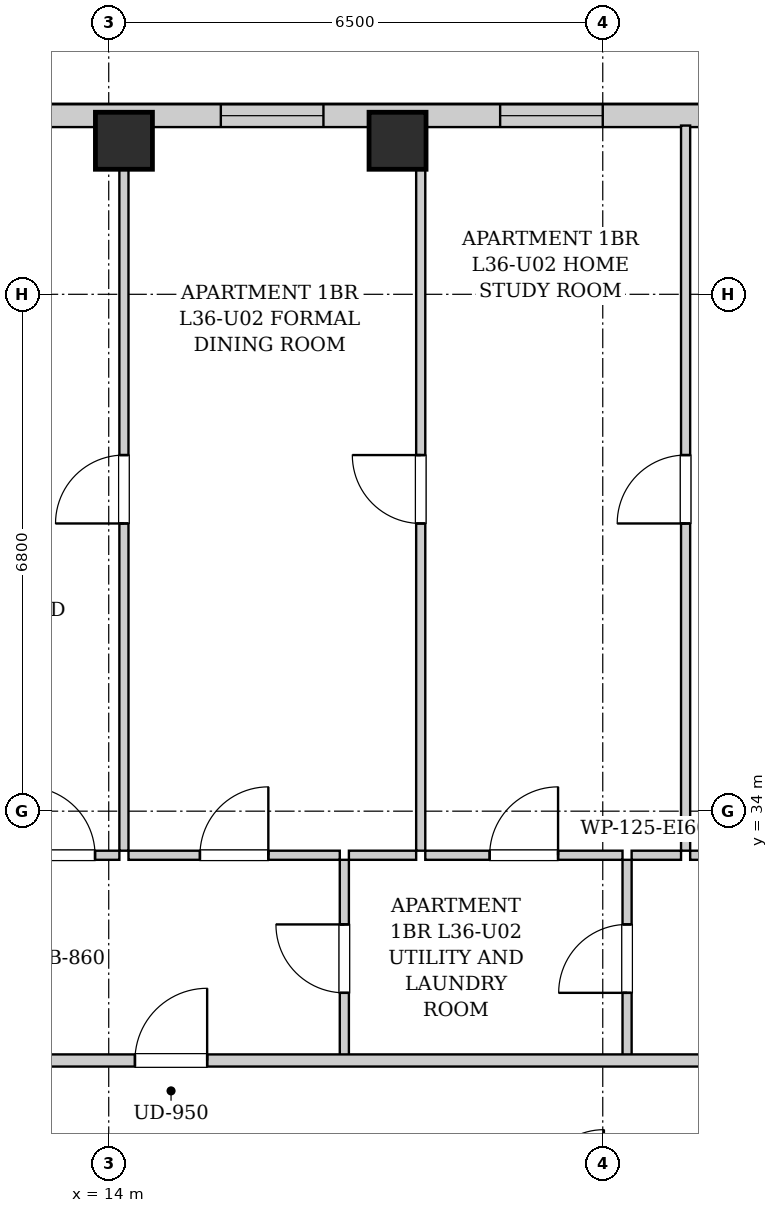
"""IFC4 building model, lengths in metres.
Left out: names, types, materials, properties, quantities, classifications, styles, units other than length and angle.
Written with IfcOpenShell. Run it as: python <this file> out.ifc"""

import sys

from ifc_helpers import new_model, si_unit, direction, frame, frame_2d, origin, origin_2d, place, context, subcontext, project, spatial, rectangle, extrude, element, fill, save


model = new_model("IFC4")
c1 = context("Model", 3, precision=1e-05, world=origin(), true_north=direction((0.0, 1.0)))
c2 = subcontext(c1, "Body", "Model", "MODEL_VIEW")
j1 = project(units=[si_unit("LENGTHUNIT", "METRE"), si_unit("PLANEANGLEUNIT", "RADIAN")], contexts=[c1])
p1 = place(None, origin())
s1 = spatial("IfcSite", under=j1, at=p1, CompositionType="ELEMENT")
p2 = place(p1, origin())
s2 = spatial("IfcBuilding", under=s1, at=p2, CompositionType="ELEMENT")
p3 = place(p2, frame((0.0, 0.0, 127.65)))
s3 = spatial("IfcBuildingStorey", under=s2, at=p3, CompositionType="ELEMENT", Elevation=127.65)
for number, where, z_axis, x_axis in (
    (1, (14.2, 42.82, 0.0), (0.0, 0.0, 1.0), (1.0, 0.0, 0.0)),
    (2, (17.8, 42.82, 0.0), (0.0, 0.0, 1.0), (1.0, 0.0, 0.0)),
):
    element("IfcColumn", number, at=place(p3, frame(where, z_axis=z_axis, x_axis=x_axis)), inside=s3, PredefinedType="COLUMN", context=c2, shape_type="SweptSolid", body=[
        extrude(rectangle(XDim=0.75, YDim=0.75, at=origin_2d()), origin(), (0.0, 0.0, 1.0), 3.25),
    ])
p4 = place(p3, frame((10.0, 43.15, 0.0), z_axis=(0.0, 0.0, 1.0), x_axis=(1.0, 0.0, 0.0)))
e3 = element("IfcWall", 3, at=p4, inside=s3, PredefinedType="SOLIDWALL", context=c2, shape_type="SweptSolid", body=[
    extrude(rectangle(XDim=21.9, YDim=0.3, at=frame_2d((10.95, 0.0))), origin(), (0.0, 0.0, 1.0), 2.99),
])
p5 = place(p4, frame((5.475, 0.0, 0.55)))
e4 = element("IfcOpeningElement", 4, at=p5, cuts=e3, PredefinedType="OPENING", context=c2, shape_type="SweptSolid", body=[
    extrude(rectangle(XDim=1.35, YDim=1.2, at=frame_2d((0.675, 0.6))), frame((0.0, 0.16, 0.0), z_axis=(0.0, -1.0, 0.0), x_axis=(1.0, 0.0, 0.0)), (0.0, 0.0, 1.0), 0.32),
])
p6 = place(p4, frame((9.15, 0.0, 0.55)))
e5 = element("IfcOpeningElement", 5, at=p6, cuts=e3, PredefinedType="OPENING", context=c2, shape_type="SweptSolid", body=[
    extrude(rectangle(XDim=1.35, YDim=1.2, at=frame_2d((0.675, 0.6))), frame((0.0, 0.16, 0.0), z_axis=(0.0, -1.0, 0.0), x_axis=(1.0, 0.0, 0.0)), (0.0, 0.0, 1.0), 0.32),
])
p7 = place(p4, frame((17.5, 0.0, 0.55)))
e6 = element("IfcOpeningElement", 6, at=p7, cuts=e3, PredefinedType="OPENING", context=c2, shape_type="SweptSolid", body=[
    extrude(rectangle(XDim=1.35, YDim=1.2, at=frame_2d((0.675, 0.6))), frame((0.0, 0.16, 0.0), z_axis=(0.0, -1.0, 0.0), x_axis=(1.0, 0.0, 0.0)), (0.0, 0.0, 1.0), 0.32),
])
p8 = place(p4, frame((19.8, 0.0, 0.55)))
e7 = element("IfcOpeningElement", 7, at=p8, cuts=e3, PredefinedType="OPENING", context=c2, shape_type="SweptSolid", body=[
    extrude(rectangle(XDim=1.35, YDim=1.2, at=frame_2d((0.675, 0.6))), frame((0.0, 0.16, 0.0), z_axis=(0.0, -1.0, 0.0), x_axis=(1.0, 0.0, 0.0)), (0.0, 0.0, 1.0), 0.32),
])
p9 = place(p3, frame((17.1, 30.76, 0.0), z_axis=(0.0, 0.0, 1.0), x_axis=(0.0, 1.0, 0.0)))
e8 = element("IfcWall", 8, at=p9, inside=s3, PredefinedType="PARTITIONING", context=c2, shape_type="SweptSolid", body=[
    extrude(rectangle(XDim=2.6, YDim=0.12, at=frame_2d((1.3, 0.0))), origin(), (0.0, 0.0, 1.0), 2.99),
])
p10 = place(p9, frame((0.85, 0.0, 0.0)))
e9 = element("IfcOpeningElement", 9, at=p10, cuts=e8, PredefinedType="OPENING", context=c2, shape_type="SweptSolid", body=[
    extrude(rectangle(XDim=0.9, YDim=2.05, at=frame_2d((0.45, 1.025))), frame((0.0, 0.07, 0.0), z_axis=(0.0, -1.0, 0.0), x_axis=(1.0, 0.0, 0.0)), (0.0, 0.0, 1.0), 0.14),
])
p11 = place(p3, frame((12.6, 33.42, 0.0), z_axis=(0.0, 0.0, 1.0), x_axis=(1.0, 0.0, 0.0)))
e10 = element("IfcWall", 10, at=p11, inside=s3, PredefinedType="PARTITIONING", context=c2, shape_type="SweptSolid", body=[
    extrude(rectangle(XDim=1.54, YDim=0.12, at=frame_2d((0.77, 0.0))), origin(), (0.0, 0.0, 1.0), 2.99),
])
p12 = place(p11, frame((0.32, 0.0, 0.0)))
e11 = element("IfcOpeningElement", 11, at=p12, cuts=e10, PredefinedType="OPENING", context=c2, shape_type="SweptSolid", body=[
    extrude(rectangle(XDim=0.9, YDim=2.05, at=frame_2d((0.45, 1.025))), frame((0.0, 0.07, 0.0), z_axis=(0.0, -1.0, 0.0), x_axis=(1.0, 0.0, 0.0)), (0.0, 0.0, 1.0), 0.14),
])
p13 = place(p3, frame((14.26, 33.42, 0.0), z_axis=(0.0, 0.0, 1.0), x_axis=(1.0, 0.0, 0.0)))
e12 = element("IfcWall", 12, at=p13, inside=s3, PredefinedType="PARTITIONING", context=c2, shape_type="SweptSolid", body=[
    extrude(rectangle(XDim=2.78, YDim=0.12, at=frame_2d((1.39, 0.0))), origin(), (0.0, 0.0, 1.0), 2.99),
])
p14 = place(p13, frame((0.94, 0.0, 0.0)))
e13 = element("IfcOpeningElement", 13, at=p14, cuts=e12, PredefinedType="OPENING", context=c2, shape_type="SweptSolid", body=[
    extrude(rectangle(XDim=0.9, YDim=2.05, at=frame_2d((0.45, 1.025))), frame((0.0, 0.07, 0.0), z_axis=(0.0, -1.0, 0.0), x_axis=(1.0, 0.0, 0.0)), (0.0, 0.0, 1.0), 0.14),
])
p15 = place(p3, frame((20.82, 30.76, 0.0), z_axis=(0.0, 0.0, 1.0), x_axis=(0.0, 1.0, 0.0)))
e14 = element("IfcWall", 14, at=p15, inside=s3, PredefinedType="PARTITIONING", context=c2, shape_type="SweptSolid", body=[
    extrude(rectangle(XDim=2.6, YDim=0.12, at=frame_2d((1.3, 0.0))), origin(), (0.0, 0.0, 1.0), 2.99),
])
p16 = place(p15, frame((0.85, 0.0, 0.0)))
e15 = element("IfcOpeningElement", 15, at=p16, cuts=e14, PredefinedType="OPENING", context=c2, shape_type="SweptSolid", body=[
    extrude(rectangle(XDim=0.9, YDim=2.05, at=frame_2d((0.45, 1.025))), frame((0.0, 0.07, 0.0), z_axis=(0.0, -1.0, 0.0), x_axis=(1.0, 0.0, 0.0)), (0.0, 0.0, 1.0), 0.14),
])
p17 = place(p3, frame((17.16, 33.42, 0.0), z_axis=(0.0, 0.0, 1.0), x_axis=(1.0, 0.0, 0.0)))
e16 = element("IfcWall", 16, at=p17, inside=s3, PredefinedType="PARTITIONING", context=c2, shape_type="SweptSolid", body=[
    extrude(rectangle(XDim=0.885, YDim=0.12, at=frame_2d((0.442, 0.0))), origin(), (0.0, 0.0, 1.0), 2.99),
])
p18 = place(p3, frame((18.165, 33.42, 0.0), z_axis=(0.0, 0.0, 1.0), x_axis=(1.0, 0.0, 0.0)))
e17 = element("IfcWall", 17, at=p18, inside=s3, PredefinedType="PARTITIONING", context=c2, shape_type="SweptSolid", body=[
    extrude(rectangle(XDim=2.595, YDim=0.12, at=frame_2d((1.297, 0.0))), origin(), (0.0, 0.0, 1.0), 2.99),
])
p19 = place(p18, frame((0.847, 0.0, 0.0)))
e18 = element("IfcOpeningElement", 18, at=p19, cuts=e17, PredefinedType="OPENING", context=c2, shape_type="SweptSolid", body=[
    extrude(rectangle(XDim=0.9, YDim=2.05, at=frame_2d((0.45, 1.025))), frame((0.0, 0.07, 0.0), z_axis=(0.0, -1.0, 0.0), x_axis=(1.0, 0.0, 0.0)), (0.0, 0.0, 1.0), 0.14),
])
p20 = place(p3, frame((20.88, 33.42, 0.0), z_axis=(0.0, 0.0, 1.0), x_axis=(1.0, 0.0, 0.0)))
e19 = element("IfcWall", 19, at=p20, inside=s3, PredefinedType="PARTITIONING", context=c2, shape_type="SweptSolid", body=[
    extrude(rectangle(XDim=0.65, YDim=0.12, at=frame_2d((0.325, 0.0))), origin(), (0.0, 0.0, 1.0), 2.99),
])
p21 = place(p3, frame((21.65, 33.42, 0.0), z_axis=(0.0, 0.0, 1.0), x_axis=(1.0, 0.0, 0.0)))
e20 = element("IfcWall", 20, at=p21, inside=s3, PredefinedType="PARTITIONING", context=c2, shape_type="SweptSolid", body=[
    extrude(rectangle(XDim=2.38, YDim=0.12, at=frame_2d((1.19, 0.0))), origin(), (0.0, 0.0, 1.0), 2.99),
])
p22 = place(p21, frame((0.74, 0.0, 0.0)))
e21 = element("IfcOpeningElement", 21, at=p22, cuts=e20, PredefinedType="OPENING", context=c2, shape_type="SweptSolid", body=[
    extrude(rectangle(XDim=0.9, YDim=2.05, at=frame_2d((0.45, 1.025))), frame((0.0, 0.07, 0.0), z_axis=(0.0, -1.0, 0.0), x_axis=(1.0, 0.0, 0.0)), (0.0, 0.0, 1.0), 0.14),
])
p23 = place(p3, frame((14.2, 33.48, 0.0), z_axis=(0.0, 0.0, 1.0), x_axis=(0.0, 1.0, 0.0)))
e22 = element("IfcWall", 22, at=p23, inside=s3, PredefinedType="PARTITIONING", context=c2, shape_type="SweptSolid", body=[
    extrude(rectangle(XDim=9.54, YDim=0.12, at=frame_2d((4.77, 0.0))), origin(), (0.0, 0.0, 1.0), 2.99),
])
p24 = place(p23, frame((4.305, 0.0, 0.0)))
e23 = element("IfcOpeningElement", 23, at=p24, cuts=e22, PredefinedType="OPENING", context=c2, shape_type="SweptSolid", body=[
    extrude(rectangle(XDim=0.9, YDim=2.05, at=frame_2d((0.45, 1.025))), frame((0.0, 0.07, 0.0), z_axis=(0.0, -1.0, 0.0), x_axis=(1.0, 0.0, 0.0)), (0.0, 0.0, 1.0), 0.14),
])
p25 = place(p3, frame((18.105, 33.48, 0.0), z_axis=(0.0, 0.0, 1.0), x_axis=(0.0, 1.0, 0.0)))
e24 = element("IfcWall", 24, at=p25, inside=s3, PredefinedType="PARTITIONING", context=c2, shape_type="SweptSolid", body=[
    extrude(rectangle(XDim=9.54, YDim=0.12, at=frame_2d((4.77, 0.0))), origin(), (0.0, 0.0, 1.0), 2.99),
])
p26 = place(p25, frame((4.305, 0.0, 0.0)))
e25 = element("IfcOpeningElement", 25, at=p26, cuts=e24, PredefinedType="OPENING", context=c2, shape_type="SweptSolid", body=[
    extrude(rectangle(XDim=0.9, YDim=2.05, at=frame_2d((0.45, 1.025))), frame((0.0, 0.07, 0.0), z_axis=(0.0, -1.0, 0.0), x_axis=(1.0, 0.0, 0.0)), (0.0, 0.0, 1.0), 0.14),
])
p27 = place(p3, frame((21.59, 33.48, 0.0), z_axis=(0.0, 0.0, 1.0), x_axis=(0.0, 1.0, 0.0)))
e26 = element("IfcWall", 26, at=p27, inside=s3, PredefinedType="PARTITIONING", context=c2, shape_type="SweptSolid", body=[
    extrude(rectangle(XDim=9.54, YDim=0.12, at=frame_2d((4.77, 0.0))), origin(), (0.0, 0.0, 1.0), 2.99),
])
p28 = place(p27, frame((4.305, 0.0, 0.0)))
e27 = element("IfcOpeningElement", 27, at=p28, cuts=e26, PredefinedType="OPENING", context=c2, shape_type="SweptSolid", body=[
    extrude(rectangle(XDim=0.9, YDim=2.05, at=frame_2d((0.45, 1.025))), frame((0.0, 0.07, 0.0), z_axis=(0.0, -1.0, 0.0), x_axis=(1.0, 0.0, 0.0)), (0.0, 0.0, 1.0), 0.14),
])
p29 = place(p3, frame((10.05, 30.72, 0.0), z_axis=(0.0, 0.0, 1.0), x_axis=(1.0, 0.0, 0.0)))
e28 = element("IfcWall", 28, at=p29, inside=s3, PredefinedType="PARTITIONING", context=c2, shape_type="SweptSolid", body=[
    extrude(rectangle(XDim=27.7, YDim=0.16, at=frame_2d((13.85, 0.0))), origin(), (0.0, 0.0, 1.0), 2.99),
])
p30 = place(p29, frame((4.295, 0.0, 0.0)))
e29 = element("IfcOpeningElement", 29, at=p30, cuts=e28, PredefinedType="OPENING", context=c2, shape_type="SweptSolid", body=[
    extrude(rectangle(XDim=0.95, YDim=2.1, at=frame_2d((0.475, 1.05))), frame((0.0, 0.09, 0.0), z_axis=(0.0, -1.0, 0.0), x_axis=(1.0, 0.0, 0.0)), (0.0, 0.0, 1.0), 0.18),
])
p31 = place(p29, frame((23.785, 0.0, 0.0)))
e30 = element("IfcOpeningElement", 30, at=p31, cuts=e28, PredefinedType="OPENING", context=c2, shape_type="SweptSolid", body=[
    extrude(rectangle(XDim=0.95, YDim=2.1, at=frame_2d((0.475, 1.05))), frame((0.0, 0.09, 0.0), z_axis=(0.0, -1.0, 0.0), x_axis=(1.0, 0.0, 0.0)), (0.0, 0.0, 1.0), 0.18),
])
p32 = place(p10, origin())
e31 = element("IfcDoor", 31, at=p32, inside=s3, OperationType="SINGLE_SWING_RIGHT", PredefinedType="DOOR", context=c2, shape_type="SweptSolid", body=[
    extrude(rectangle(XDim=0.9, YDim=2.05, at=frame_2d((0.45, 1.025))), frame((0.0, 0.025, 0.0), z_axis=(0.0, -1.0, 0.0), x_axis=(1.0, 0.0, 0.0)), (0.0, 0.0, 1.0), 0.05),
])
fill(e9, e31)
p33 = place(p12, origin())
e32 = element("IfcDoor", 32, at=p33, inside=s3, OperationType="SINGLE_SWING_LEFT", PredefinedType="DOOR", context=c2, shape_type="SweptSolid", body=[
    extrude(rectangle(XDim=0.9, YDim=2.05, at=frame_2d((0.45, 1.025))), frame((0.0, 0.025, 0.0), z_axis=(0.0, -1.0, 0.0), x_axis=(1.0, 0.0, 0.0)), (0.0, 0.0, 1.0), 0.05),
])
fill(e11, e32)
p34 = place(p14, origin())
e33 = element("IfcDoor", 33, at=p34, inside=s3, OperationType="SINGLE_SWING_RIGHT", PredefinedType="DOOR", context=c2, shape_type="SweptSolid", body=[
    extrude(rectangle(XDim=0.9, YDim=2.05, at=frame_2d((0.45, 1.025))), frame((0.0, 0.025, 0.0), z_axis=(0.0, -1.0, 0.0), x_axis=(1.0, 0.0, 0.0)), (0.0, 0.0, 1.0), 0.05),
])
fill(e13, e33)
p35 = place(p16, origin())
e34 = element("IfcDoor", 34, at=p35, inside=s3, OperationType="SINGLE_SWING_LEFT", PredefinedType="DOOR", context=c2, shape_type="SweptSolid", body=[
    extrude(rectangle(XDim=0.9, YDim=2.05, at=frame_2d((0.45, 1.025))), frame((0.0, 0.025, 0.0), z_axis=(0.0, -1.0, 0.0), x_axis=(1.0, 0.0, 0.0)), (0.0, 0.0, 1.0), 0.05),
])
fill(e15, e34)
p36 = place(p19, origin())
e35 = element("IfcDoor", 35, at=p36, inside=s3, OperationType="SINGLE_SWING_RIGHT", PredefinedType="DOOR", context=c2, shape_type="SweptSolid", body=[
    extrude(rectangle(XDim=0.9, YDim=2.05, at=frame_2d((0.45, 1.025))), frame((0.0, 0.025, 0.0), z_axis=(0.0, -1.0, 0.0), x_axis=(1.0, 0.0, 0.0)), (0.0, 0.0, 1.0), 0.05),
])
fill(e18, e35)
p37 = place(p24, origin())
e36 = element("IfcDoor", 36, at=p37, inside=s3, OperationType="SINGLE_SWING_LEFT", PredefinedType="DOOR", context=c2, shape_type="SweptSolid", body=[
    extrude(rectangle(XDim=0.9, YDim=2.05, at=frame_2d((0.45, 1.025))), frame((0.0, 0.025, 0.0), z_axis=(0.0, -1.0, 0.0), x_axis=(1.0, 0.0, 0.0)), (0.0, 0.0, 1.0), 0.05),
])
fill(e23, e36)
p38 = place(p26, origin())
e37 = element("IfcDoor", 37, at=p38, inside=s3, OperationType="SINGLE_SWING_RIGHT", PredefinedType="DOOR", context=c2, shape_type="SweptSolid", body=[
    extrude(rectangle(XDim=0.9, YDim=2.05, at=frame_2d((0.45, 1.025))), frame((0.0, 0.025, 0.0), z_axis=(0.0, -1.0, 0.0), x_axis=(1.0, 0.0, 0.0)), (0.0, 0.0, 1.0), 0.05),
])
fill(e25, e37)
p39 = place(p28, origin())
e38 = element("IfcDoor", 38, at=p39, inside=s3, OperationType="SINGLE_SWING_LEFT", PredefinedType="DOOR", context=c2, shape_type="SweptSolid", body=[
    extrude(rectangle(XDim=0.9, YDim=2.05, at=frame_2d((0.45, 1.025))), frame((0.0, 0.025, 0.0), z_axis=(0.0, -1.0, 0.0), x_axis=(1.0, 0.0, 0.0)), (0.0, 0.0, 1.0), 0.05),
])
fill(e27, e38)
p40 = place(p30, origin())
e39 = element("IfcDoor", 39, at=p40, inside=s3, OperationType="SINGLE_SWING_RIGHT", PredefinedType="DOOR", context=c2, shape_type="SweptSolid", body=[
    extrude(rectangle(XDim=0.95, YDim=2.1, at=frame_2d((0.475, 1.05))), frame((0.0, 0.025, 0.0), z_axis=(0.0, -1.0, 0.0), x_axis=(1.0, 0.0, 0.0)), (0.0, 0.0, 1.0), 0.05),
])
fill(e29, e39)
p41 = place(p5, origin())
e40 = element("IfcWindow", 40, at=p41, inside=s3, PartitioningType="SINGLE_PANEL", PredefinedType="WINDOW", context=c2, shape_type="SweptSolid", body=[
    extrude(rectangle(XDim=1.35, YDim=1.2, at=frame_2d((0.675, 0.6))), frame((0.0, 0.03, 0.0), z_axis=(0.0, -1.0, 0.0), x_axis=(1.0, 0.0, 0.0)), (0.0, 0.0, 1.0), 0.06),
])
fill(e4, e40)
p42 = place(p6, origin())
e41 = element("IfcWindow", 41, at=p42, inside=s3, PartitioningType="SINGLE_PANEL", PredefinedType="WINDOW", context=c2, shape_type="SweptSolid", body=[
    extrude(rectangle(XDim=1.35, YDim=1.2, at=frame_2d((0.675, 0.6))), frame((0.0, 0.03, 0.0), z_axis=(0.0, -1.0, 0.0), x_axis=(1.0, 0.0, 0.0)), (0.0, 0.0, 1.0), 0.06),
])
fill(e5, e41)
save(model, sys.argv[1])
